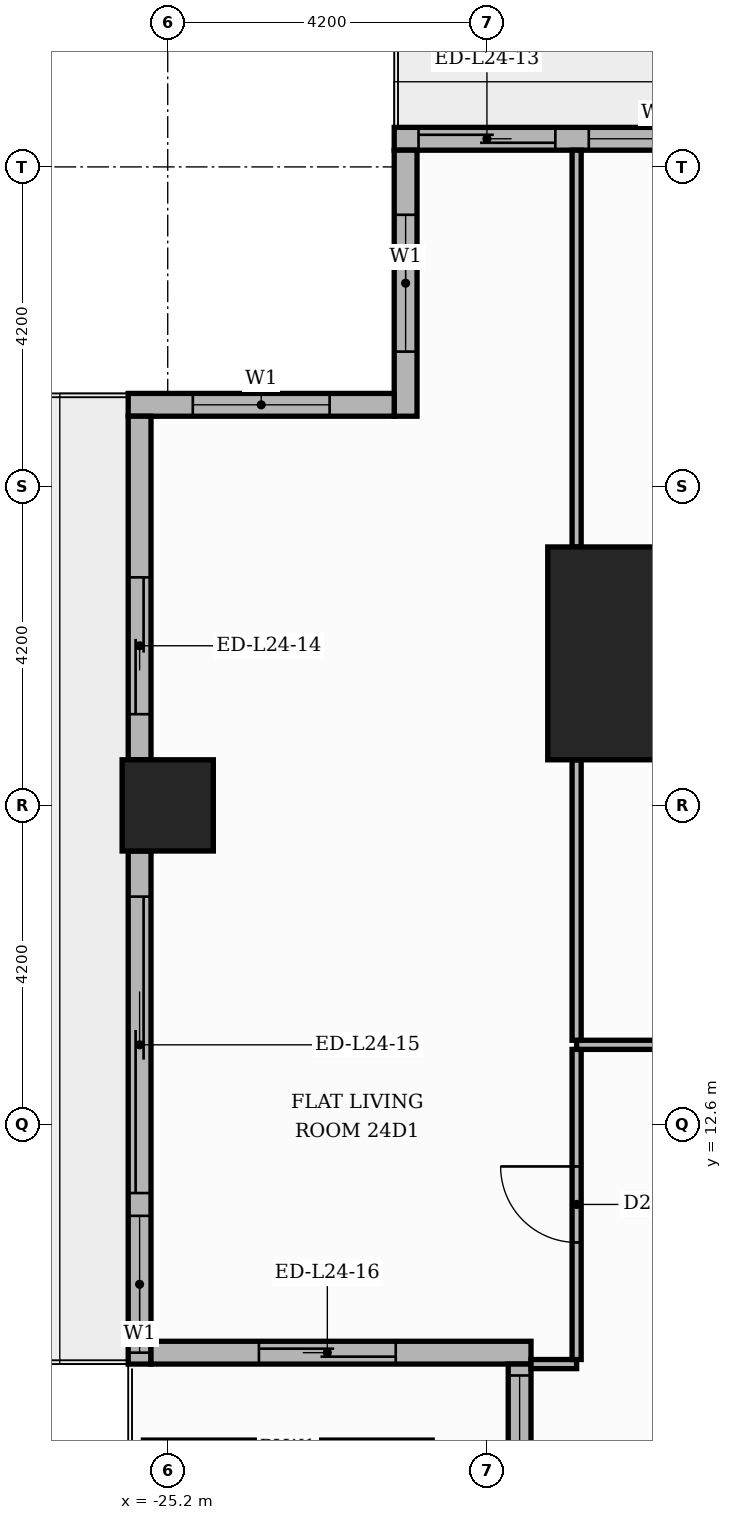
"""IFC4 building model, lengths in metres.
Left out: names, types, materials, properties, quantities, classifications, styles, units other than length and angle.
Written with IfcOpenShell. Run it as: python <this file> out.ifc"""

import sys

from ifc_helpers import new_model, si_unit, direction, frame, frame_2d, origin, origin_2d, place, context, subcontext, project, spatial, rectangle, extrude, element, fill, save


model = new_model("IFC4")
c1 = context("Model", 3, precision=1e-05, world=origin(), true_north=direction((0.0, 1.0)))
c2 = subcontext(c1, "Body", "Model", "MODEL_VIEW")
j1 = project(units=[si_unit("LENGTHUNIT", "METRE"), si_unit("PLANEANGLEUNIT", "RADIAN")], contexts=[c1])
p1 = place(None, origin())
s1 = spatial("IfcSite", under=j1, at=p1, CompositionType="ELEMENT")
p2 = place(p1, origin())
s2 = spatial("IfcBuilding", under=s1, at=p2, CompositionType="ELEMENT")
p3 = place(p2, frame((0.0, 0.0, 102.6)))
s3 = spatial("IfcBuildingStorey", under=s2, at=p3, CompositionType="ELEMENT", Elevation=102.6)
p4 = place(p3, frame((-18.8, 18.8, 0.0), z_axis=(0.0, 0.0, 1.0), x_axis=(1.0, 0.0, 0.0)))
e1 = element("IfcColumn", 1, at=p4, inside=s3, PredefinedType="COLUMN", context=c2, shape_type="SweptSolid", body=[
    extrude(rectangle(XDim=2.8, YDim=2.8, at=origin_2d()), origin(), (0.0, 0.0, 1.0), 3.9),
])
p5 = place(p3, frame((-25.2, 16.8, 0.0), z_axis=(0.0, 0.0, 1.0), x_axis=(1.0, 0.0, 0.0)))
e2 = element("IfcColumn", 2, at=p5, inside=s3, PredefinedType="COLUMN", context=c2, shape_type="SweptSolid", body=[
    extrude(rectangle(XDim=1.2, YDim=1.2, at=origin_2d()), origin(), (0.0, 0.0, 1.0), 3.9),
])
p6 = place(p3, frame((-17.4, 25.57, 0.0), z_axis=(0.0, 0.0, 1.0), x_axis=(-1.0, 0.0, 0.0)))
e3 = element("IfcWall", 3, at=p6, inside=s3, PredefinedType="STANDARD", context=c2, shape_type="SweptSolid", body=[
    extrude(rectangle(XDim=4.82, YDim=0.3, at=frame_2d((2.41, 0.0))), origin(), (0.0, 0.0, 1.0), 3.48),
])
p7 = place(p6, frame((2.7, 0.0, 0.0)))
e4 = element("IfcOpeningElement", 4, at=p7, cuts=e3, PredefinedType="OPENING", context=c2, shape_type="SweptSolid", body=[
    extrude(rectangle(XDim=1.8, YDim=2.4, at=frame_2d((0.9, 1.2))), frame((0.0, 0.16, 0.0), z_axis=(0.0, -1.0, 0.0), x_axis=(1.0, 0.0, 0.0)), (0.0, 0.0, 1.0), 0.32),
])
p8 = place(p6, frame((0.46, 0.0, 0.9)))
e5 = element("IfcOpeningElement", 5, at=p8, cuts=e3, PredefinedType="OPENING", context=c2, shape_type="SweptSolid", body=[
    extrude(rectangle(XDim=1.8, YDim=2.1, at=frame_2d((0.9, 1.05))), frame((0.0, 0.16, 0.0), z_axis=(0.0, -1.0, 0.0), x_axis=(1.0, 0.0, 0.0)), (0.0, 0.0, 1.0), 0.32),
])
p9 = place(p3, frame((-22.07, 25.42, 0.0), z_axis=(0.0, 0.0, 1.0), x_axis=(0.0, -1.0, 0.0)))
e6 = element("IfcWall", 6, at=p9, inside=s3, PredefinedType="STANDARD", context=c2, shape_type="SweptSolid", body=[
    extrude(rectangle(XDim=3.5, YDim=0.3, at=frame_2d((1.75, 0.0))), origin(), (0.0, 0.0, 1.0), 3.48),
])
p10 = place(p9, frame((0.85, 0.0, 0.9)))
e7 = element("IfcOpeningElement", 7, at=p10, cuts=e6, PredefinedType="OPENING", context=c2, shape_type="SweptSolid", body=[
    extrude(rectangle(XDim=1.8, YDim=2.1, at=frame_2d((0.9, 1.05))), frame((0.0, 0.16, 0.0), z_axis=(0.0, -1.0, 0.0), x_axis=(1.0, 0.0, 0.0)), (0.0, 0.0, 1.0), 0.32),
])
p11 = place(p3, frame((-22.22, 22.07, 0.0), z_axis=(0.0, 0.0, 1.0), x_axis=(-1.0, 0.0, 0.0)))
e8 = element("IfcWall", 8, at=p11, inside=s3, PredefinedType="STANDARD", context=c2, shape_type="SweptSolid", body=[
    extrude(rectangle(XDim=3.5, YDim=0.3, at=frame_2d((1.75, 0.0))), origin(), (0.0, 0.0, 1.0), 3.48),
])
p12 = place(p11, frame((0.85, 0.0, 0.9)))
e9 = element("IfcOpeningElement", 9, at=p12, cuts=e8, PredefinedType="OPENING", context=c2, shape_type="SweptSolid", body=[
    extrude(rectangle(XDim=1.8, YDim=2.1, at=frame_2d((0.9, 1.05))), frame((0.0, 0.16, 0.0), z_axis=(0.0, -1.0, 0.0), x_axis=(1.0, 0.0, 0.0)), (0.0, 0.0, 1.0), 0.32),
])
p13 = place(p3, frame((-25.57, 21.92, 0.0), z_axis=(0.0, 0.0, 1.0), x_axis=(0.0, -1.0, 0.0)))
e10 = element("IfcWall", 10, at=p13, inside=s3, PredefinedType="STANDARD", context=c2, shape_type="SweptSolid", body=[
    extrude(rectangle(XDim=4.52, YDim=0.3, at=frame_2d((2.26, 0.0))), origin(), (0.0, 0.0, 1.0), 3.48),
])
p14 = place(p13, frame((2.12, 0.0, 0.0)))
e11 = element("IfcOpeningElement", 11, at=p14, cuts=e10, PredefinedType="OPENING", context=c2, shape_type="SweptSolid", body=[
    extrude(rectangle(XDim=1.8, YDim=2.4, at=frame_2d((0.9, 1.2))), frame((0.0, 0.16, 0.0), z_axis=(0.0, -1.0, 0.0), x_axis=(1.0, 0.0, 0.0)), (0.0, 0.0, 1.0), 0.32),
])
p15 = place(p3, frame((-25.57, 16.2, 0.0), z_axis=(0.0, 0.0, 1.0), x_axis=(0.0, -1.0, 0.0)))
e12 = element("IfcWall", 12, at=p15, inside=s3, PredefinedType="STANDARD", context=c2, shape_type="SweptSolid", body=[
    extrude(rectangle(XDim=6.75, YDim=0.3, at=frame_2d((3.375, 0.0))), origin(), (0.0, 0.0, 1.0), 3.48),
])
p16 = place(p15, frame((0.6, 0.0, 0.0)))
e13 = element("IfcOpeningElement", 13, at=p16, cuts=e12, PredefinedType="OPENING", context=c2, shape_type="SweptSolid", body=[
    extrude(rectangle(XDim=3.9, YDim=2.4, at=frame_2d((1.95, 1.2))), frame((0.0, 0.16, 0.0), z_axis=(0.0, -1.0, 0.0), x_axis=(1.0, 0.0, 0.0)), (0.0, 0.0, 1.0), 0.32),
])
p17 = place(p15, frame((4.8, 0.0, 0.9)))
e14 = element("IfcOpeningElement", 14, at=p17, cuts=e12, PredefinedType="OPENING", context=c2, shape_type="SweptSolid", body=[
    extrude(rectangle(XDim=1.8, YDim=2.1, at=frame_2d((0.9, 1.05))), frame((0.0, 0.16, 0.0), z_axis=(0.0, -1.0, 0.0), x_axis=(1.0, 0.0, 0.0)), (0.0, 0.0, 1.0), 0.32),
])
p18 = place(p3, frame((-25.42, 9.6, 0.0), z_axis=(0.0, 0.0, 1.0), x_axis=(1.0, 0.0, 0.0)))
e15 = element("IfcWall", 15, at=p18, inside=s3, PredefinedType="STANDARD", context=c2, shape_type="SweptSolid", body=[
    extrude(rectangle(XDim=5.0, YDim=0.3, at=frame_2d((2.5, 0.0))), origin(), (0.0, 0.0, 1.0), 3.48),
])
p19 = place(p18, frame((1.42, 0.0, 0.0)))
e16 = element("IfcOpeningElement", 16, at=p19, cuts=e15, PredefinedType="OPENING", context=c2, shape_type="SweptSolid", body=[
    extrude(rectangle(XDim=1.8, YDim=2.4, at=frame_2d((0.9, 1.2))), frame((0.0, 0.16, 0.0), z_axis=(0.0, -1.0, 0.0), x_axis=(1.0, 0.0, 0.0)), (0.0, 0.0, 1.0), 0.32),
])
p20 = place(p3, frame((-20.57, 9.45, 0.0), z_axis=(0.0, 0.0, 1.0), x_axis=(0.0, -1.0, 0.0)))
e17 = element("IfcWall", 17, at=p20, inside=s3, PredefinedType="STANDARD", context=c2, shape_type="SweptSolid", body=[
    extrude(rectangle(XDim=19.2, YDim=0.3, at=frame_2d((9.6, 0.0))), origin(), (0.0, 0.0, 1.0), 3.48),
])
p21 = place(p20, frame((0.15, 0.0, 0.9)))
e18 = element("IfcOpeningElement", 18, at=p21, cuts=e17, PredefinedType="OPENING", context=c2, shape_type="SweptSolid", body=[
    extrude(rectangle(XDim=6.0, YDim=2.1, at=frame_2d((3.0, 1.05))), frame((0.0, 0.16, 0.0), z_axis=(0.0, -1.0, 0.0), x_axis=(1.0, 0.0, 0.0)), (0.0, 0.0, 1.0), 0.32),
])
p22 = place(p20, frame((6.45, 0.0, 0.9)))
e19 = element("IfcOpeningElement", 19, at=p22, cuts=e17, PredefinedType="OPENING", context=c2, shape_type="SweptSolid", body=[
    extrude(rectangle(XDim=6.0, YDim=2.1, at=frame_2d((3.0, 1.05))), frame((0.0, 0.16, 0.0), z_axis=(0.0, -1.0, 0.0), x_axis=(1.0, 0.0, 0.0)), (0.0, 0.0, 1.0), 0.32),
])
p23 = place(p20, frame((12.75, 0.0, 0.9)))
e20 = element("IfcOpeningElement", 20, at=p23, cuts=e17, PredefinedType="OPENING", context=c2, shape_type="SweptSolid", body=[
    extrude(rectangle(XDim=6.0, YDim=2.1, at=frame_2d((3.0, 1.05))), frame((0.0, 0.16, 0.0), z_axis=(0.0, -1.0, 0.0), x_axis=(1.0, 0.0, 0.0)), (0.0, 0.0, 1.0), 0.32),
])
p24 = place(p3, frame((-20.42, 9.45, 0.0), z_axis=(0.0, 0.0, 1.0), x_axis=(1.0, 0.0, 0.0)))
e21 = element("IfcWall", 21, at=p24, inside=s3, PredefinedType="PARTITIONING", context=c2, shape_type="SweptSolid", body=[
    extrude(rectangle(XDim=0.6, YDim=0.12, at=frame_2d((0.3, 0.0))), origin(), (0.0, 0.0, 1.0), 3.48),
])
p25 = place(p3, frame((-19.82, 9.51, 0.0), z_axis=(0.0, 0.0, 1.0), x_axis=(0.0, 1.0, 0.0)))
e22 = element("IfcWall", 22, at=p25, inside=s3, PredefinedType="PARTITIONING", context=c2, shape_type="SweptSolid", body=[
    extrude(rectangle(XDim=4.08, YDim=0.12, at=frame_2d((2.04, 0.0))), origin(), (0.0, 0.0, 1.0), 3.48),
])
p26 = place(p25, frame((1.54, 0.0, 0.0)))
e23 = element("IfcOpeningElement", 23, at=p26, cuts=e22, PredefinedType="OPENING", context=c2, shape_type="SweptSolid", body=[
    extrude(rectangle(XDim=1.0, YDim=2.1, at=frame_2d((0.5, 1.05))), frame((0.0, 0.07, 0.0), z_axis=(0.0, -1.0, 0.0), x_axis=(1.0, 0.0, 0.0)), (0.0, 0.0, 1.0), 0.14),
])
p27 = place(p3, frame((-19.82, 13.65, 0.0), z_axis=(0.0, 0.0, 1.0), x_axis=(1.0, 0.0, 0.0)))
e24 = element("IfcWall", 24, at=p27, inside=s3, PredefinedType="PARTITIONING", context=c2, shape_type="SweptSolid", body=[
    extrude(rectangle(XDim=6.17, YDim=0.12, at=frame_2d((3.085, 0.0))), origin(), (0.0, 0.0, 1.0), 3.48),
])
p28 = place(p27, frame((2.635, 0.0, 0.0)))
e25 = element("IfcOpeningElement", 25, at=p28, cuts=e24, PredefinedType="OPENING", context=c2, shape_type="SweptSolid", body=[
    extrude(rectangle(XDim=0.9, YDim=2.1, at=frame_2d((0.45, 1.05))), frame((0.0, 0.07, 0.0), z_axis=(0.0, -1.0, 0.0), x_axis=(1.0, 0.0, 0.0)), (0.0, 0.0, 1.0), 0.14),
])
p29 = place(p3, frame((-19.82, 13.71, 0.0), z_axis=(0.0, 0.0, 1.0), x_axis=(0.0, 1.0, 0.0)))
e26 = element("IfcWall", 26, at=p29, inside=s3, PredefinedType="PARTITIONING", context=c2, shape_type="SweptSolid", body=[
    extrude(rectangle(XDim=3.69, YDim=0.12, at=frame_2d((1.845, 0.0))), origin(), (0.0, 0.0, 1.0), 3.48),
])
p30 = place(p3, frame((-19.82, 20.2, 0.0), z_axis=(0.0, 0.0, 1.0), x_axis=(0.0, 1.0, 0.0)))
e27 = element("IfcWall", 27, at=p30, inside=s3, PredefinedType="PARTITIONING", context=c2, shape_type="SweptSolid", body=[
    extrude(rectangle(XDim=5.22, YDim=0.12, at=frame_2d((2.61, 0.0))), origin(), (0.0, 0.0, 1.0), 3.48),
])
p31 = place(p7, origin())
e28 = element("IfcDoor", 28, at=p31, inside=s3, OperationType="SLIDING_TO_LEFT", PredefinedType="DOOR", context=c2, shape_type="SweptSolid", body=[
    extrude(rectangle(XDim=1.8, YDim=2.4, at=frame_2d((0.9, 1.2))), frame((0.0, 0.025, 0.0), z_axis=(0.0, -1.0, 0.0), x_axis=(1.0, 0.0, 0.0)), (0.0, 0.0, 1.0), 0.05),
])
fill(e4, e28)
p32 = place(p8, origin())
e29 = element("IfcWindow", 29, at=p32, inside=s3, PartitioningType="SINGLE_PANEL", PredefinedType="WINDOW", context=c2, shape_type="SweptSolid", body=[
    extrude(rectangle(XDim=1.8, YDim=2.1, at=frame_2d((0.9, 1.05))), frame((0.0, 0.03, 0.0), z_axis=(0.0, -1.0, 0.0), x_axis=(1.0, 0.0, 0.0)), (0.0, 0.0, 1.0), 0.06),
])
fill(e5, e29)
p33 = place(p10, origin())
e30 = element("IfcWindow", 30, at=p33, inside=s3, PartitioningType="SINGLE_PANEL", PredefinedType="WINDOW", context=c2, shape_type="SweptSolid", body=[
    extrude(rectangle(XDim=1.8, YDim=2.1, at=frame_2d((0.9, 1.05))), frame((0.0, 0.03, 0.0), z_axis=(0.0, -1.0, 0.0), x_axis=(1.0, 0.0, 0.0)), (0.0, 0.0, 1.0), 0.06),
])
fill(e7, e30)
p34 = place(p12, origin())
e31 = element("IfcWindow", 31, at=p34, inside=s3, PartitioningType="SINGLE_PANEL", PredefinedType="WINDOW", context=c2, shape_type="SweptSolid", body=[
    extrude(rectangle(XDim=1.8, YDim=2.1, at=frame_2d((0.9, 1.05))), frame((0.0, 0.03, 0.0), z_axis=(0.0, -1.0, 0.0), x_axis=(1.0, 0.0, 0.0)), (0.0, 0.0, 1.0), 0.06),
])
fill(e9, e31)
p35 = place(p14, origin())
e32 = element("IfcDoor", 32, at=p35, inside=s3, OperationType="SLIDING_TO_RIGHT", PredefinedType="DOOR", context=c2, shape_type="SweptSolid", body=[
    extrude(rectangle(XDim=1.8, YDim=2.4, at=frame_2d((0.9, 1.2))), frame((0.0, 0.025, 0.0), z_axis=(0.0, -1.0, 0.0), x_axis=(1.0, 0.0, 0.0)), (0.0, 0.0, 1.0), 0.05),
])
fill(e11, e32)
p36 = place(p16, origin())
e33 = element("IfcDoor", 33, at=p36, inside=s3, OperationType="SLIDING_TO_LEFT", PredefinedType="DOOR", context=c2, shape_type="SweptSolid", body=[
    extrude(rectangle(XDim=3.9, YDim=2.4, at=frame_2d((1.95, 1.2))), frame((0.0, 0.025, 0.0), z_axis=(0.0, -1.0, 0.0), x_axis=(1.0, 0.0, 0.0)), (0.0, 0.0, 1.0), 0.05),
])
fill(e13, e33)
p37 = place(p17, origin())
e34 = element("IfcWindow", 34, at=p37, inside=s3, PartitioningType="SINGLE_PANEL", PredefinedType="WINDOW", context=c2, shape_type="SweptSolid", body=[
    extrude(rectangle(XDim=1.8, YDim=2.1, at=frame_2d((0.9, 1.05))), frame((0.0, 0.03, 0.0), z_axis=(0.0, -1.0, 0.0), x_axis=(1.0, 0.0, 0.0)), (0.0, 0.0, 1.0), 0.06),
])
fill(e14, e34)
p38 = place(p19, origin())
e35 = element("IfcDoor", 35, at=p38, inside=s3, OperationType="SLIDING_TO_LEFT", PredefinedType="DOOR", context=c2, shape_type="SweptSolid", body=[
    extrude(rectangle(XDim=1.8, YDim=2.4, at=frame_2d((0.9, 1.2))), frame((0.0, 0.025, 0.0), z_axis=(0.0, -1.0, 0.0), x_axis=(1.0, 0.0, 0.0)), (0.0, 0.0, 1.0), 0.05),
])
fill(e16, e35)
p39 = place(p21, origin())
e36 = element("IfcWindow", 36, at=p39, inside=s3, PartitioningType="SINGLE_PANEL", PredefinedType="WINDOW", context=c2, shape_type="SweptSolid", body=[
    extrude(rectangle(XDim=6.0, YDim=2.1, at=frame_2d((3.0, 1.05))), frame((0.0, 0.03, 0.0), z_axis=(0.0, -1.0, 0.0), x_axis=(1.0, 0.0, 0.0)), (0.0, 0.0, 1.0), 0.06),
])
fill(e18, e36)
p40 = place(p26, origin())
e37 = element("IfcDoor", 37, at=p40, inside=s3, OperationType="SINGLE_SWING_RIGHT", PredefinedType="DOOR", context=c2, shape_type="SweptSolid", body=[
    extrude(rectangle(XDim=1.0, YDim=2.1, at=frame_2d((0.5, 1.05))), frame((0.0, 0.025, 0.0), z_axis=(0.0, -1.0, 0.0), x_axis=(1.0, 0.0, 0.0)), (0.0, 0.0, 1.0), 0.05),
])
fill(e23, e37)
save(model, sys.argv[1])
